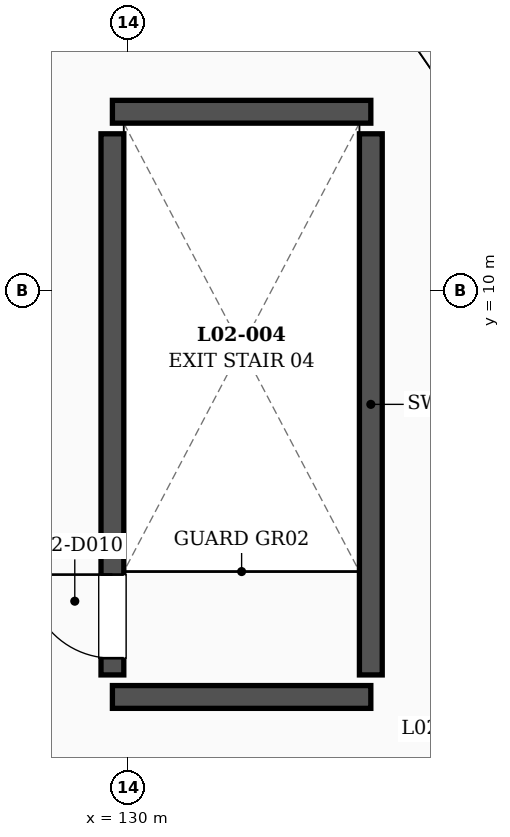
"""IFC4 building model, lengths in metres.
Left out: names, types, materials, properties, quantities, classifications, styles, units other than length and angle.
Written with IfcOpenShell. Run it as: python <this file> out.ifc"""

import sys

from ifc_helpers import new_model, si_unit, direction, frame, frame_2d, origin, place, context, subcontext, project, spatial, rectangle, extrude, element, fill, save


model = new_model("IFC4")
c1 = context("Model", 3, precision=1e-05, world=origin(), true_north=direction((0.0, 1.0)))
c2 = subcontext(c1, "Body", "Model", "MODEL_VIEW")
j1 = project(units=[si_unit("LENGTHUNIT", "METRE"), si_unit("PLANEANGLEUNIT", "RADIAN")], contexts=[c1])
p1 = place(None, origin())
s1 = spatial("IfcSite", under=j1, at=p1, CompositionType="ELEMENT")
p2 = place(p1, origin())
s2 = spatial("IfcBuilding", under=s1, at=p2, CompositionType="ELEMENT")
p3 = place(p2, frame((0.0, 0.0, 10.8)))
s3 = spatial("IfcBuildingStorey", under=s2, at=p3, CompositionType="ELEMENT", Elevation=10.8)
p4 = place(p3, frame((130.008, 1.697, 0.0), z_axis=(0.0, 0.0, 1.0), x_axis=(0.95182847269, 0.30663098111, 0.0)))
e1 = element("IfcWall", 1, at=p4, inside=s3, PredefinedType="SOLIDWALL", context=c2, shape_type="SweptSolid", body=[
    extrude(rectangle(XDim=9.785, YDim=0.32, at=frame_2d((4.893, 0.0))), origin(), (0.0, 0.0, 1.0), 2.55),
])
p5 = place(p4, frame((3.793, 0.0, 0.55)))
e2 = element("IfcOpeningElement", 2, at=p5, cuts=e1, PredefinedType="OPENING", context=c2, shape_type="SweptSolid", body=[
    extrude(rectangle(XDim=1.8, YDim=1.8, at=frame_2d((0.9, 0.9))), frame((0.0, 0.17, 0.0), z_axis=(0.0, -1.0, 0.0), x_axis=(1.0, 0.0, 0.0)), (0.0, 0.0, 1.0), 0.34),
])
for number, where, z_axis, x_axis in (
    (3, (129.8, 4.65, 0.0), (0.0, 0.0, 1.0), (1.0, 0.0, 0.0)),
    (4, (129.8, 12.35, 0.0), (0.0, 0.0, 1.0), (1.0, 0.0, 0.0)),
):
    element("IfcWall", number, at=place(p3, frame(where, z_axis=z_axis, x_axis=x_axis)), inside=s3, PredefinedType="SHEAR", context=c2, shape_type="SweptSolid", body=[
        extrude(rectangle(XDim=3.4, YDim=0.3, at=frame_2d((1.7, 0.0))), origin(), (0.0, 0.0, 1.0), 3.98),
    ])
p6 = place(p3, frame((129.8, 4.94, 0.0), z_axis=(0.0, 0.0, 1.0), x_axis=(0.0, 1.0, 0.0)))
e5 = element("IfcWall", 5, at=p6, inside=s3, PredefinedType="SHEAR", context=c2, shape_type="SweptSolid", body=[
    extrude(rectangle(XDim=7.12, YDim=0.3, at=frame_2d((3.56, 0.0))), origin(), (0.0, 0.0, 1.0), 3.98),
])
p7 = place(p6, frame((0.22, 0.0, 0.0)))
e6 = element("IfcOpeningElement", 6, at=p7, cuts=e5, PredefinedType="OPENING", context=c2, shape_type="SweptSolid", body=[
    extrude(rectangle(XDim=1.1, YDim=2.2, at=frame_2d((0.55, 1.1))), frame((0.0, 0.16, 0.0), z_axis=(0.0, -1.0, 0.0), x_axis=(1.0, 0.0, 0.0)), (0.0, 0.0, 1.0), 0.32),
])
p8 = place(p3, frame((133.2, 4.94, 0.0), z_axis=(0.0, 0.0, 1.0), x_axis=(0.0, 1.0, 0.0)))
e7 = element("IfcWall", 7, at=p8, inside=s3, PredefinedType="SHEAR", context=c2, shape_type="SweptSolid", body=[
    extrude(rectangle(XDim=7.12, YDim=0.3, at=frame_2d((3.56, 0.0))), origin(), (0.0, 0.0, 1.0), 3.98),
])
p9 = place(p7, origin())
e8 = element("IfcDoor", 8, at=p9, inside=s3, OperationType="SINGLE_SWING_RIGHT", PredefinedType="DOOR", context=c2, shape_type="SweptSolid", body=[
    extrude(rectangle(XDim=1.1, YDim=2.2, at=frame_2d((0.55, 1.1))), frame((0.0, 0.025, 0.0), z_axis=(0.0, -1.0, 0.0), x_axis=(1.0, 0.0, 0.0)), (0.0, 0.0, 1.0), 0.05),
])
fill(e6, e8)
save(model, sys.argv[1])
